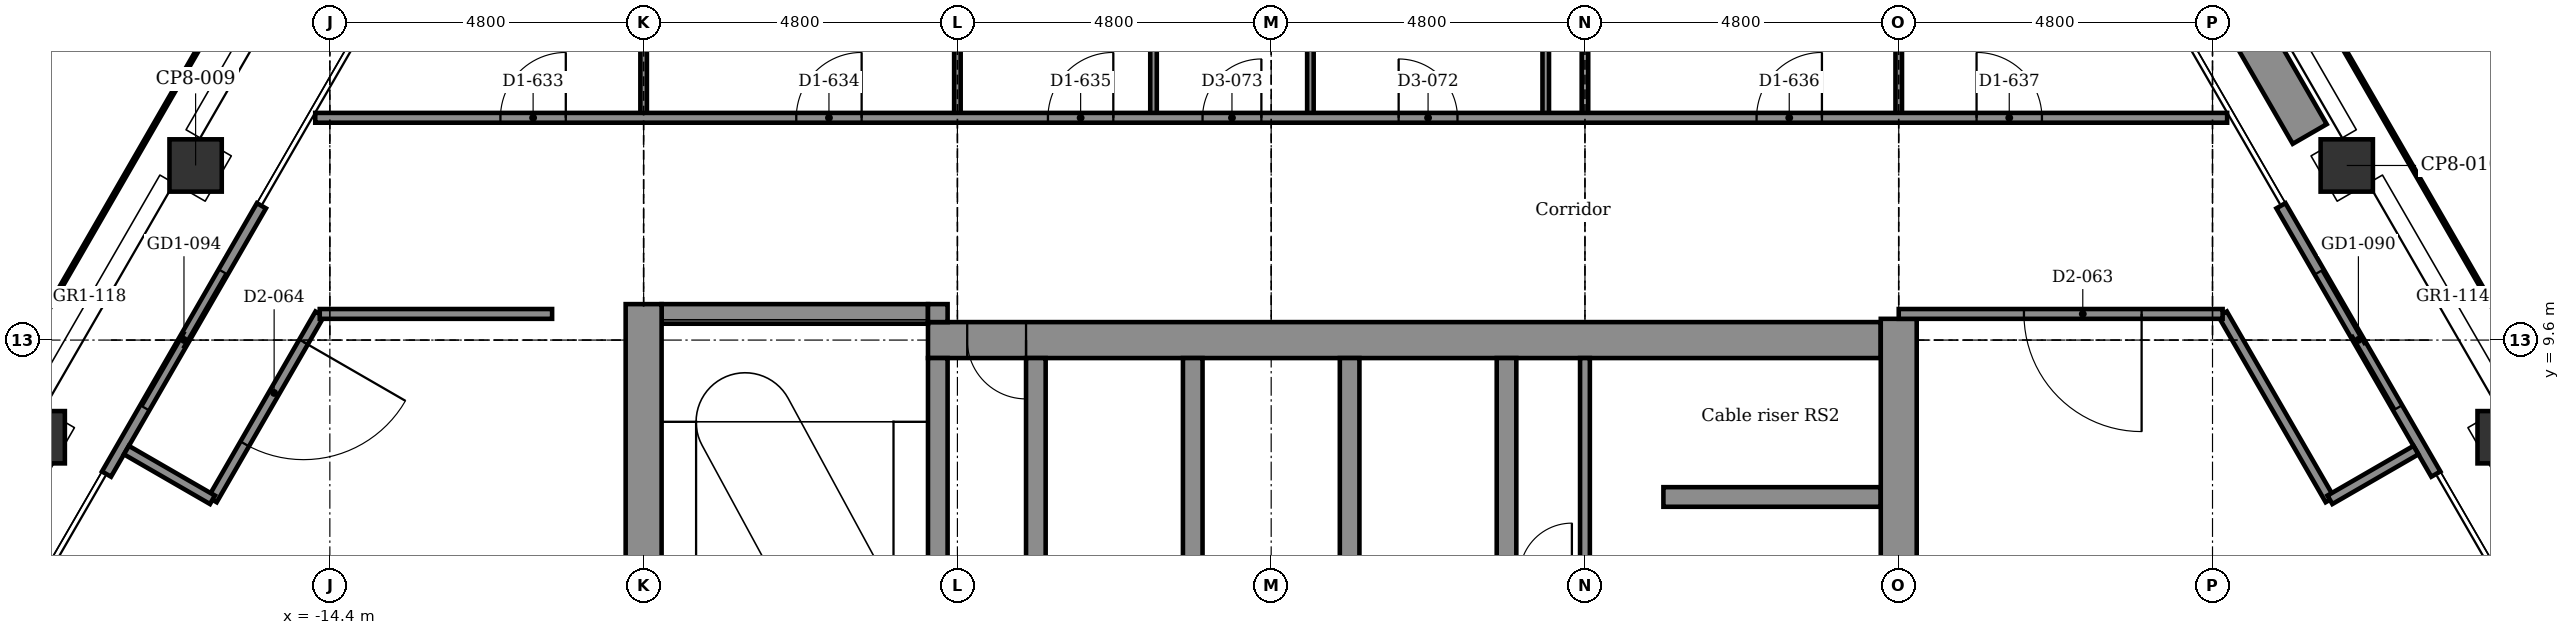
"""IFC4 building model, lengths in metres.
Left out: names, types, materials, properties, quantities, classifications, styles, units other than length and angle.
Written with IfcOpenShell. Run it as: python <this file> out.ifc"""

import sys

from ifc_helpers import new_model, si_unit, direction, frame, frame_2d, origin, origin_2d, place, context, subcontext, project, spatial, rectangle, extrude, element, fill, save


model = new_model("IFC4")
c1 = context("Model", 3, precision=1e-05, world=origin(), true_north=direction((0.0, 1.0)))
c2 = subcontext(c1, "Body", "Model", "MODEL_VIEW")
j1 = project(units=[si_unit("LENGTHUNIT", "METRE"), si_unit("PLANEANGLEUNIT", "RADIAN")], contexts=[c1])
p1 = place(None, origin())
s1 = spatial("IfcSite", under=j1, at=p1, CompositionType="ELEMENT")
p2 = place(p1, origin())
s2 = spatial("IfcBuilding", under=s1, at=p2, CompositionType="ELEMENT")
p3 = place(p2, frame((0.0, 0.0, 222.8)))
s3 = spatial("IfcBuildingStorey", under=s2, at=p3, CompositionType="ELEMENT", Elevation=222.8)
for number, where, z_axis, x_axis in (
    (1, (16.454, 12.271, -0.15), (0.0, 0.0, 1.0), (0.866, 0.5, 0.0)),
    (2, (18.854, 8.114, -0.15), (0.0, 0.0, 1.0), (0.866, 0.5, 0.0)),
    (3, (-18.854, 8.114, -0.15), (0.0, 0.0, 1.0), (0.5, 0.866, 0.0)),
    (4, (-16.454, 12.271, -0.15), (0.0, 0.0, 1.0), (0.5, 0.866, 0.0)),
):
    element("IfcColumn", number, at=place(p3, frame(where, z_axis=z_axis, x_axis=x_axis)), inside=s3, PredefinedType="COLUMN", context=c2, shape_type="SweptSolid", body=[
        extrude(rectangle(XDim=0.8, YDim=0.8, at=origin_2d()), origin(), (0.0, 0.0, 1.0), 3.9),
    ])
p4 = place(p3, frame((6.0, 7.2, -0.15), z_axis=(0.0, 0.0, 1.0), x_axis=(1.0, 0.0, 0.0)))
e5 = element("IfcWall", 5, at=p4, inside=s3, PredefinedType="STANDARD", context=c2, shape_type="SweptSolid", body=[
    extrude(rectangle(XDim=3.325, YDim=0.3, at=frame_2d((1.663, 0.0))), origin(), (0.0, 0.0, 1.0), 3.9),
])
p5 = place(p3, frame((-5.25, 9.6, -0.15), z_axis=(0.0, 0.0, 1.0), x_axis=(1.0, 0.0, 0.0)))
e6 = element("IfcWall", 6, at=p5, inside=s3, PredefinedType="SHEAR", context=c2, shape_type="SweptSolid", body=[
    extrude(rectangle(XDim=14.575, YDim=0.55, at=frame_2d((7.288, 0.0))), origin(), (0.0, 0.0, 1.0), 3.9),
])
p6 = place(p5, frame((0.6, 0.0, 0.15)))
e7 = element("IfcOpeningElement", 7, at=p6, cuts=e6, PredefinedType="OPENING", context=c2, shape_type="SweptSolid", body=[
    extrude(rectangle(XDim=0.9, YDim=2.1, at=frame_2d((0.45, 1.05))), frame((0.0, 0.285, 0.0), z_axis=(0.0, -1.0, 0.0), x_axis=(1.0, 0.0, 0.0)), (0.0, 0.0, 1.0), 0.57),
])
p7 = place(p3, frame((-9.325, 10.0, -0.15), z_axis=(0.0, 0.0, 1.0), x_axis=(1.0, 0.0, 0.0)))
e8 = element("IfcWall", 8, at=p7, inside=s3, PredefinedType="STANDARD", context=c2, shape_type="SweptSolid", body=[
    extrude(rectangle(XDim=4.075, YDim=0.3, at=frame_2d((2.038, 0.0))), origin(), (0.0, 0.0, 1.0), 3.9),
])
p8 = place(p3, frame((-9.6, 2.55, -0.15), z_axis=(0.0, 0.0, 1.0), x_axis=(0.0, 1.0, 0.0)))
e9 = element("IfcWall", 9, at=p8, inside=s3, PredefinedType="SHEAR", context=c2, shape_type="SweptSolid", body=[
    extrude(rectangle(XDim=7.6, YDim=0.55, at=frame_2d((3.8, 0.0))), origin(), (0.0, 0.0, 1.0), 3.9),
])
p9 = place(p3, frame((-5.1, 2.25, -0.15), z_axis=(0.0, 0.0, 1.0), x_axis=(0.0, 1.0, 0.0)))
e10 = element("IfcWall", 10, at=p9, inside=s3, PredefinedType="STANDARD", context=c2, shape_type="SweptSolid", body=[
    extrude(rectangle(XDim=7.075, YDim=0.3, at=frame_2d((3.538, 0.0))), origin(), (0.0, 0.0, 1.0), 3.9),
])
p10 = place(p9, frame((2.0, 0.0, 0.15)))
e11 = element("IfcOpeningElement", 11, at=p10, cuts=e10, PredefinedType="OPENING", context=c2, shape_type="SweptSolid", body=[
    extrude(rectangle(XDim=1.2, YDim=2.1, at=frame_2d((0.6, 1.05))), frame((0.0, 0.16, 0.0), z_axis=(0.0, -1.0, 0.0), x_axis=(1.0, 0.0, 0.0)), (0.0, 0.0, 1.0), 0.32),
])
p11 = place(p3, frame((-5.1, 9.875, -0.15), z_axis=(0.0, 0.0, 1.0), x_axis=(0.0, 1.0, 0.0)))
e12 = element("IfcWall", 12, at=p11, inside=s3, PredefinedType="STANDARD", context=c2, shape_type="SweptSolid", body=[
    extrude(rectangle(XDim=0.275, YDim=0.3, at=frame_2d((0.137, 0.0))), origin(), (0.0, 0.0, 1.0), 3.9),
])
for number, where, z_axis, x_axis in (
    (13, (-3.6, 5.85, -0.15), (0.0, 0.0, 1.0), (0.0, 1.0, 0.0)),
    (14, (-1.2, 5.85, -0.15), (0.0, 0.0, 1.0), (0.0, 1.0, 0.0)),
    (15, (1.2, 5.85, -0.15), (0.0, 0.0, 1.0), (0.0, 1.0, 0.0)),
    (16, (3.6, 5.85, -0.15), (0.0, 0.0, 1.0), (0.0, 1.0, 0.0)),
):
    element("IfcWall", number, at=place(p3, frame(where, z_axis=z_axis, x_axis=x_axis)), inside=s3, PredefinedType="STANDARD", context=c2, shape_type="SweptSolid", body=[
        extrude(rectangle(XDim=3.475, YDim=0.3, at=frame_2d((1.737, 0.0))), origin(), (0.0, 0.0, 1.0), 3.9),
    ])
p12 = place(p3, frame((9.6, -10.15, -0.15), z_axis=(0.0, 0.0, 1.0), x_axis=(0.0, 1.0, 0.0)))
e17 = element("IfcWall", 17, at=p12, inside=s3, PredefinedType="SHEAR", context=c2, shape_type="SweptSolid", body=[
    extrude(rectangle(XDim=20.075, YDim=0.55, at=frame_2d((10.038, 0.0))), origin(), (0.0, 0.0, 1.0), 3.9),
])
p13 = place(p3, frame((15.447, 11.655, 0.0), z_axis=(0.0, 0.0, 1.0), x_axis=(0.499978080042, -0.866038058908, 0.0)))
e18 = element("IfcWall", 18, at=p13, inside=s3, PredefinedType="PARTITIONING", context=c2, shape_type="SweptSolid", body=[
    extrude(rectangle(XDim=4.74, YDim=0.16, at=frame_2d((2.37, 0.0))), origin(), (0.0, 0.0, 1.0), 3.75),
])
p14 = place(p13, frame((1.17, 0.0, 0.0)))
e19 = element("IfcOpeningElement", 19, at=p14, cuts=e18, PredefinedType="OPENING", context=c2, shape_type="SweptSolid", body=[
    extrude(rectangle(XDim=2.4, YDim=2.4, at=frame_2d((1.2, 1.2))), frame((0.0, 0.09, 0.0), z_axis=(0.0, -1.0, 0.0), x_axis=(1.0, 0.0, 0.0)), (0.0, 0.0, 1.0), 0.18),
])
p15 = place(p3, frame((-17.817, 7.55, 0.0), z_axis=(0.0, 0.0, 1.0), x_axis=(0.499978080042, 0.866038058908, 0.0)))
e20 = element("IfcWall", 20, at=p15, inside=s3, PredefinedType="PARTITIONING", context=c2, shape_type="SweptSolid", body=[
    extrude(rectangle(XDim=4.74, YDim=0.16, at=frame_2d((2.37, 0.0))), origin(), (0.0, 0.0, 1.0), 3.75),
])
p16 = place(p15, frame((1.17, 0.0, 0.0)))
e21 = element("IfcOpeningElement", 21, at=p16, cuts=e20, PredefinedType="OPENING", context=c2, shape_type="SweptSolid", body=[
    extrude(rectangle(XDim=2.4, YDim=2.4, at=frame_2d((1.2, 1.2))), frame((0.0, 0.09, 0.0), z_axis=(0.0, -1.0, 0.0), x_axis=(1.0, 0.0, 0.0)), (0.0, 0.0, 1.0), 0.18),
])
p17 = place(p3, frame((14.187, 15.697, 0.0), z_axis=(0.0, 0.0, 1.0), x_axis=(0.499977295307, -0.866038511948, 0.0)))
e22 = element("IfcWall", 22, at=p17, inside=s3, PredefinedType="USERDEFINED", context=c2, shape_type="SweptSolid", body=[
    extrude(rectangle(XDim=3.4, YDim=0.6, at=frame_2d((1.7, 0.0))), origin(), (0.0, 0.0, 1.0), 0.7),
])
for number, where, z_axis, x_axis in (
    (23, (9.6, 13.0, 0.0), (0.0, 0.0, 1.0), (0.0, 1.0, 0.0)),
    (24, (4.8, 13.0, 0.0), (0.0, 0.0, 1.0), (0.0, 1.0, 0.0)),
):
    element("IfcWall", number, at=place(p3, frame(where, z_axis=z_axis, x_axis=x_axis)), inside=s3, PredefinedType="PARTITIONING", context=c2, shape_type="SweptSolid", body=[
        extrude(rectangle(XDim=6.115, YDim=0.1, at=frame_2d((3.057, 0.0))), origin(), (0.0, 0.0, 1.0), 3.217),
    ])
p18 = place(p3, frame((4.8, 6.0, 0.0), z_axis=(0.0, 0.0, 1.0), x_axis=(0.0, 1.0, 0.0)))
e25 = element("IfcWall", 25, at=p18, inside=s3, PredefinedType="PARTITIONING", context=c2, shape_type="SweptSolid", body=[
    extrude(rectangle(XDim=3.325, YDim=0.15, at=frame_2d((1.663, 0.0))), origin(), (0.0, 0.0, 1.0), 3.75),
])
for number, where, z_axis, x_axis in (
    (26, (4.2, 13.0, 0.0), (0.0, 0.0, 1.0), (0.0, 1.0, 0.0)),
    (27, (0.6, 13.0, 0.0), (0.0, 0.0, 1.0), (0.0, 1.0, 0.0)),
    (28, (-1.8, 13.0, 0.0), (0.0, 0.0, 1.0), (0.0, 1.0, 0.0)),
):
    element("IfcWall", number, at=place(p3, frame(where, z_axis=z_axis, x_axis=x_axis)), inside=s3, PredefinedType="PARTITIONING", context=c2, shape_type="SweptSolid", body=[
        extrude(rectangle(XDim=4.8, YDim=0.1, at=frame_2d((2.4, 0.0))), origin(), (0.0, 0.0, 1.0), 3.75),
    ])
p19 = place(p3, frame((-4.8, 13.0, 0.0), z_axis=(0.0, 0.0, 1.0), x_axis=(0.0, 1.0, 0.0)))
e29 = element("IfcWall", 29, at=p19, inside=s3, PredefinedType="PARTITIONING", context=c2, shape_type="SweptSolid", body=[
    extrude(rectangle(XDim=6.115, YDim=0.1, at=frame_2d((3.057, 0.0))), origin(), (0.0, 0.0, 1.0), 3.217),
])
p20 = place(p3, frame((-9.6, 13.0, 0.0), z_axis=(0.0, 0.0, 1.0), x_axis=(0.0, 1.0, 0.0)))
e30 = element("IfcWall", 30, at=p20, inside=s3, PredefinedType="PARTITIONING", context=c2, shape_type="SweptSolid", body=[
    extrude(rectangle(XDim=6.115, YDim=0.1, at=frame_2d((3.057, 0.0))), origin(), (0.0, 0.0, 1.0), 3.293),
])
p21 = place(p3, frame((14.555, 10.0, 0.0), z_axis=(0.0, 0.0, 1.0), x_axis=(0.499954196102, -0.866051847062, 0.0)))
e31 = element("IfcWall", 31, at=p21, inside=s3, PredefinedType="PARTITIONING", context=c2, shape_type="SweptSolid", body=[
    extrude(rectangle(XDim=3.283, YDim=0.15, at=frame_2d((1.642, 0.0))), origin(), (0.0, 0.0, 1.0), 3.75),
])
p22 = place(p3, frame((-16.196, 7.157, 0.0), z_axis=(0.0, 0.0, 1.0), x_axis=(0.499954196102, 0.866051847062, 0.0)))
e32 = element("IfcWall", 32, at=p22, inside=s3, PredefinedType="PARTITIONING", context=c2, shape_type="SweptSolid", body=[
    extrude(rectangle(XDim=3.283, YDim=0.15, at=frame_2d((1.642, 0.0))), origin(), (0.0, 0.0, 1.0), 3.75),
])
p23 = place(p22, frame((0.987, 0.0, 0.0)))
e33 = element("IfcOpeningElement", 33, at=p23, cuts=e32, PredefinedType="OPENING", context=c2, shape_type="SweptSolid", body=[
    extrude(rectangle(XDim=1.8, YDim=2.1, at=frame_2d((0.9, 1.05))), frame((0.0, 0.085, 0.0), z_axis=(0.0, -1.0, 0.0), x_axis=(1.0, 0.0, 0.0)), (0.0, 0.0, 1.0), 0.17),
])
for number, where, z_axis, x_axis in (
    (34, (-17.512, 7.917, 0.0), (0.0, 0.0, 1.0), (0.866, -0.5, 0.0)),
    (35, (16.196, 7.157, 0.0), (0.0, 0.0, 1.0), (0.866, 0.5, 0.0)),
):
    element("IfcWall", number, at=place(p3, frame(where, z_axis=z_axis, x_axis=x_axis)), inside=s3, PredefinedType="PARTITIONING", context=c2, shape_type="SweptSolid", body=[
        extrude(rectangle(XDim=1.52, YDim=0.15, at=frame_2d((0.76, 0.0))), origin(), (0.0, 0.0, 1.0), 3.75),
    ])
p24 = place(p3, frame((-14.555, 10.0, 0.0), z_axis=(0.0, 0.0, 1.0), x_axis=(1.0, 0.0, 0.0)))
e36 = element("IfcWall", 36, at=p24, inside=s3, PredefinedType="PARTITIONING", context=c2, shape_type="SweptSolid", body=[
    extrude(rectangle(XDim=3.555, YDim=0.15, at=frame_2d((1.777, 0.0))), origin(), (0.0, 0.0, 1.0), 3.75),
])
p25 = place(p3, frame((9.6, 10.0, 0.0), z_axis=(0.0, 0.0, 1.0), x_axis=(1.0, 0.0, 0.0)))
e37 = element("IfcWall", 37, at=p25, inside=s3, PredefinedType="PARTITIONING", context=c2, shape_type="SweptSolid", body=[
    extrude(rectangle(XDim=4.955, YDim=0.15, at=frame_2d((2.477, 0.0))), origin(), (0.0, 0.0, 1.0), 3.75),
])
p26 = place(p25, frame((1.916, 0.0, 0.0)))
e38 = element("IfcOpeningElement", 38, at=p26, cuts=e37, PredefinedType="OPENING", context=c2, shape_type="SweptSolid", body=[
    extrude(rectangle(XDim=1.8, YDim=2.1, at=frame_2d((0.9, 1.05))), frame((0.0, 0.085, 0.0), z_axis=(0.0, -1.0, 0.0), x_axis=(1.0, 0.0, 0.0)), (0.0, 0.0, 1.0), 0.17),
])
p27 = place(p3, frame((-14.624, 13.0, 0.0), z_axis=(0.0, 0.0, 1.0), x_axis=(1.0, 0.0, 0.0)))
e39 = element("IfcWall", 39, at=p27, inside=s3, PredefinedType="PARTITIONING", context=c2, shape_type="SweptSolid", body=[
    extrude(rectangle(XDim=29.248, YDim=0.15, at=frame_2d((14.624, 0.0))), origin(), (0.0, 0.0, 1.0), 3.75),
])
p28 = place(p27, frame((2.833, 0.0, 0.0)))
e40 = element("IfcOpeningElement", 40, at=p28, cuts=e39, PredefinedType="OPENING", context=c2, shape_type="SweptSolid", body=[
    extrude(rectangle(XDim=1.0, YDim=2.1, at=frame_2d((0.5, 1.05))), frame((0.0, 0.085, 0.0), z_axis=(0.0, -1.0, 0.0), x_axis=(1.0, 0.0, 0.0)), (0.0, 0.0, 1.0), 0.17),
])
p29 = place(p27, frame((7.359, 0.0, 0.0)))
e41 = element("IfcOpeningElement", 41, at=p29, cuts=e39, PredefinedType="OPENING", context=c2, shape_type="SweptSolid", body=[
    extrude(rectangle(XDim=1.0, YDim=2.1, at=frame_2d((0.5, 1.05))), frame((0.0, 0.085, 0.0), z_axis=(0.0, -1.0, 0.0), x_axis=(1.0, 0.0, 0.0)), (0.0, 0.0, 1.0), 0.17),
])
p30 = place(p27, frame((11.209, 0.0, 0.0)))
e42 = element("IfcOpeningElement", 42, at=p30, cuts=e39, PredefinedType="OPENING", context=c2, shape_type="SweptSolid", body=[
    extrude(rectangle(XDim=1.0, YDim=2.1, at=frame_2d((0.5, 1.05))), frame((0.0, 0.085, 0.0), z_axis=(0.0, -1.0, 0.0), x_axis=(1.0, 0.0, 0.0)), (0.0, 0.0, 1.0), 0.17),
])
p31 = place(p27, frame((22.049, 0.0, 0.0)))
e43 = element("IfcOpeningElement", 43, at=p31, cuts=e39, PredefinedType="OPENING", context=c2, shape_type="SweptSolid", body=[
    extrude(rectangle(XDim=1.0, YDim=2.1, at=frame_2d((0.5, 1.05))), frame((0.0, 0.085, 0.0), z_axis=(0.0, -1.0, 0.0), x_axis=(1.0, 0.0, 0.0)), (0.0, 0.0, 1.0), 0.17),
])
p32 = place(p27, frame((25.414, 0.0, 0.0)))
e44 = element("IfcOpeningElement", 44, at=p32, cuts=e39, PredefinedType="OPENING", context=c2, shape_type="SweptSolid", body=[
    extrude(rectangle(XDim=1.0, YDim=2.1, at=frame_2d((0.5, 1.05))), frame((0.0, 0.085, 0.0), z_axis=(0.0, -1.0, 0.0), x_axis=(1.0, 0.0, 0.0)), (0.0, 0.0, 1.0), 0.17),
])
p33 = place(p27, frame((16.574, 0.0, 0.0)))
e45 = element("IfcOpeningElement", 45, at=p33, cuts=e39, PredefinedType="OPENING", context=c2, shape_type="SweptSolid", body=[
    extrude(rectangle(XDim=0.9, YDim=2.1, at=frame_2d((0.45, 1.05))), frame((0.0, 0.085, 0.0), z_axis=(0.0, -1.0, 0.0), x_axis=(1.0, 0.0, 0.0)), (0.0, 0.0, 1.0), 0.17),
])
p34 = place(p27, frame((13.574, 0.0, 0.0)))
e46 = element("IfcOpeningElement", 46, at=p34, cuts=e39, PredefinedType="OPENING", context=c2, shape_type="SweptSolid", body=[
    extrude(rectangle(XDim=0.9, YDim=2.1, at=frame_2d((0.45, 1.05))), frame((0.0, 0.085, 0.0), z_axis=(0.0, -1.0, 0.0), x_axis=(1.0, 0.0, 0.0)), (0.0, 0.0, 1.0), 0.17),
])
p35 = place(p14, origin())
e47 = element("IfcDoor", 47, at=p35, inside=s3, OperationType="DOUBLE_DOOR_SLIDING", PredefinedType="DOOR", context=c2, shape_type="SweptSolid", body=[
    extrude(rectangle(XDim=2.4, YDim=2.4, at=frame_2d((1.2, 1.2))), frame((0.0, 0.025, 0.0), z_axis=(0.0, -1.0, 0.0), x_axis=(1.0, 0.0, 0.0)), (0.0, 0.0, 1.0), 0.05),
])
fill(e19, e47)
p36 = place(p16, origin())
e48 = element("IfcDoor", 48, at=p36, inside=s3, OperationType="DOUBLE_DOOR_SLIDING", PredefinedType="DOOR", context=c2, shape_type="SweptSolid", body=[
    extrude(rectangle(XDim=2.4, YDim=2.4, at=frame_2d((1.2, 1.2))), frame((0.0, 0.025, 0.0), z_axis=(0.0, -1.0, 0.0), x_axis=(1.0, 0.0, 0.0)), (0.0, 0.0, 1.0), 0.05),
])
fill(e21, e48)
p37 = place(p28, origin())
e49 = element("IfcDoor", 49, at=p37, inside=s3, OperationType="SINGLE_SWING_RIGHT", PredefinedType="DOOR", context=c2, shape_type="SweptSolid", body=[
    extrude(rectangle(XDim=1.0, YDim=2.1, at=frame_2d((0.5, 1.05))), frame((0.0, 0.025, 0.0), z_axis=(0.0, -1.0, 0.0), x_axis=(1.0, 0.0, 0.0)), (0.0, 0.0, 1.0), 0.05),
])
fill(e40, e49)
p38 = place(p29, origin())
e50 = element("IfcDoor", 50, at=p38, inside=s3, OperationType="SINGLE_SWING_RIGHT", PredefinedType="DOOR", context=c2, shape_type="SweptSolid", body=[
    extrude(rectangle(XDim=1.0, YDim=2.1, at=frame_2d((0.5, 1.05))), frame((0.0, 0.025, 0.0), z_axis=(0.0, -1.0, 0.0), x_axis=(1.0, 0.0, 0.0)), (0.0, 0.0, 1.0), 0.05),
])
fill(e41, e50)
p39 = place(p30, origin())
e51 = element("IfcDoor", 51, at=p39, inside=s3, OperationType="SINGLE_SWING_RIGHT", PredefinedType="DOOR", context=c2, shape_type="SweptSolid", body=[
    extrude(rectangle(XDim=1.0, YDim=2.1, at=frame_2d((0.5, 1.05))), frame((0.0, 0.025, 0.0), z_axis=(0.0, -1.0, 0.0), x_axis=(1.0, 0.0, 0.0)), (0.0, 0.0, 1.0), 0.05),
])
fill(e42, e51)
p40 = place(p31, origin())
e52 = element("IfcDoor", 52, at=p40, inside=s3, OperationType="SINGLE_SWING_RIGHT", PredefinedType="DOOR", context=c2, shape_type="SweptSolid", body=[
    extrude(rectangle(XDim=1.0, YDim=2.1, at=frame_2d((0.5, 1.05))), frame((0.0, 0.025, 0.0), z_axis=(0.0, -1.0, 0.0), x_axis=(1.0, 0.0, 0.0)), (0.0, 0.0, 1.0), 0.05),
])
fill(e43, e52)
p41 = place(p32, origin())
e53 = element("IfcDoor", 53, at=p41, inside=s3, OperationType="SINGLE_SWING_LEFT", PredefinedType="DOOR", context=c2, shape_type="SweptSolid", body=[
    extrude(rectangle(XDim=1.0, YDim=2.1, at=frame_2d((0.5, 1.05))), frame((0.0, 0.025, 0.0), z_axis=(0.0, -1.0, 0.0), x_axis=(1.0, 0.0, 0.0)), (0.0, 0.0, 1.0), 0.05),
])
fill(e44, e53)
p42 = place(p26, frame((1.8, 0.0, 0.0), z_axis=(0.0, 0.0, 1.0), x_axis=(-1.0, 0.0, 0.0)))
e54 = element("IfcDoor", 54, at=p42, inside=s3, OperationType="SINGLE_SWING_RIGHT", PredefinedType="DOOR", context=c2, shape_type="SweptSolid", body=[
    extrude(rectangle(XDim=1.8, YDim=2.1, at=frame_2d((0.9, 1.05))), frame((0.0, 0.025, 0.0), z_axis=(0.0, -1.0, 0.0), x_axis=(1.0, 0.0, 0.0)), (0.0, 0.0, 1.0), 0.05),
])
fill(e38, e54)
p43 = place(p23, frame((1.8, 0.0, 0.0), z_axis=(0.0, 0.0, 1.0), x_axis=(-1.0, 0.0, 0.0)))
e55 = element("IfcDoor", 55, at=p43, inside=s3, OperationType="SINGLE_SWING_RIGHT", PredefinedType="DOOR", context=c2, shape_type="SweptSolid", body=[
    extrude(rectangle(XDim=1.8, YDim=2.1, at=frame_2d((0.9, 1.05))), frame((0.0, 0.025, 0.0), z_axis=(0.0, -1.0, 0.0), x_axis=(1.0, 0.0, 0.0)), (0.0, 0.0, 1.0), 0.05),
])
fill(e33, e55)
p44 = place(p33, origin())
e56 = element("IfcDoor", 56, at=p44, inside=s3, OperationType="SINGLE_SWING_LEFT", PredefinedType="DOOR", context=c2, shape_type="SweptSolid", body=[
    extrude(rectangle(XDim=0.9, YDim=2.1, at=frame_2d((0.45, 1.05))), frame((0.0, 0.025, 0.0), z_axis=(0.0, -1.0, 0.0), x_axis=(1.0, 0.0, 0.0)), (0.0, 0.0, 1.0), 0.05),
])
fill(e45, e56)
p45 = place(p34, origin())
e57 = element("IfcDoor", 57, at=p45, inside=s3, OperationType="SINGLE_SWING_RIGHT", PredefinedType="DOOR", context=c2, shape_type="SweptSolid", body=[
    extrude(rectangle(XDim=0.9, YDim=2.1, at=frame_2d((0.45, 1.05))), frame((0.0, 0.025, 0.0), z_axis=(0.0, -1.0, 0.0), x_axis=(1.0, 0.0, 0.0)), (0.0, 0.0, 1.0), 0.05),
])
fill(e46, e57)
p46 = place(p6, frame((0.9, 0.0, 0.0), z_axis=(0.0, 0.0, 1.0), x_axis=(-1.0, 0.0, 0.0)))
e58 = element("IfcDoor", 58, at=p46, inside=s3, OperationType="SINGLE_SWING_RIGHT", PredefinedType="DOOR", context=c2, shape_type="SweptSolid", body=[
    extrude(rectangle(XDim=0.9, YDim=2.1, at=frame_2d((0.45, 1.05))), frame((0.0, 0.025, 0.0), z_axis=(0.0, -1.0, 0.0), x_axis=(1.0, 0.0, 0.0)), (0.0, 0.0, 1.0), 0.05),
])
fill(e7, e58)
save(model, sys.argv[1])
